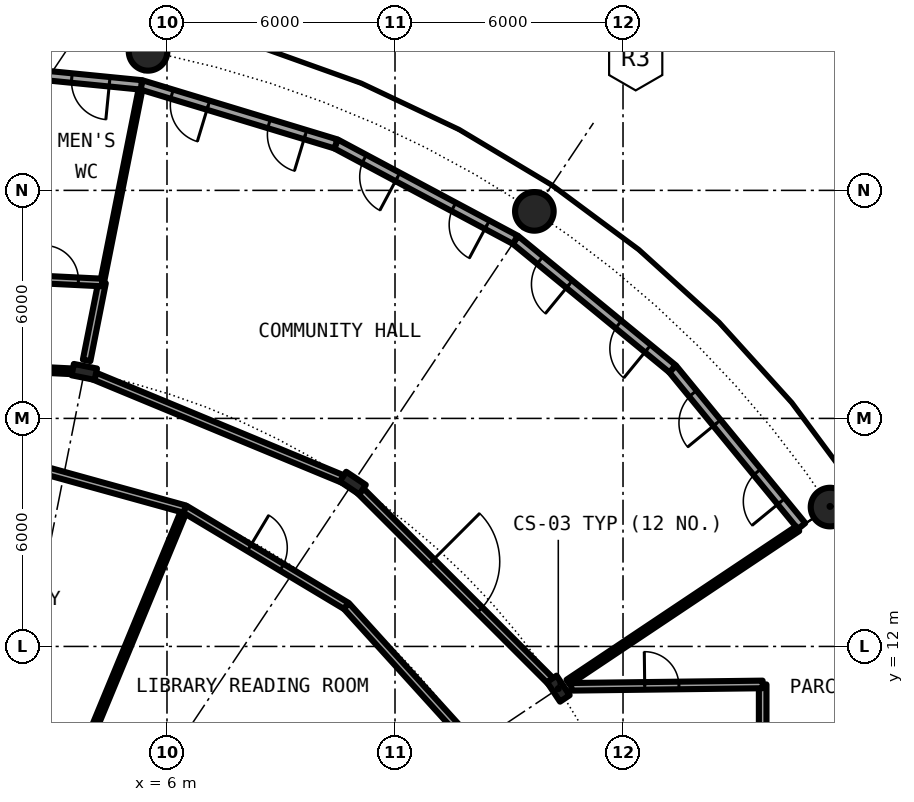
"""IFC4 building model, lengths in metres.
Left out: names, types, materials, properties, quantities, classifications, styles, units other than length and angle.
Written with IfcOpenShell. Run it as: python <this file> out.ifc"""

import sys

from ifc_helpers import new_model, si_unit, direction, frame, frame_2d, origin, origin_2d, place, context, subcontext, project, spatial, rectangle, hollow_circle, i_section, extrude, element, fill, save


model = new_model("IFC4")
c1 = context("Model", 3, precision=1e-05, world=origin(), true_north=direction((0.0, 1.0)))
c2 = subcontext(c1, "Body", "Model", "MODEL_VIEW")
j1 = project(units=[si_unit("LENGTHUNIT", "METRE"), si_unit("PLANEANGLEUNIT", "RADIAN")], contexts=[c1])
p1 = place(None, origin())
s1 = spatial("IfcSite", under=j1, at=p1, CompositionType="ELEMENT")
p2 = place(p1, origin())
s2 = spatial("IfcBuilding", under=s1, at=p2, CompositionType="ELEMENT")
p3 = place(p2, frame((0.0, 0.0, 53.3)))
s3 = spatial("IfcBuildingStorey", under=s2, at=p3, CompositionType="ELEMENT", Elevation=53.3)
for number, where, z_axis, x_axis in (
    (1, (23.448, 15.667, 0.0), (0.0, 0.0, 1.0), (1.0, 0.0, 0.0)),
    (2, (15.667, 23.448, 0.0), (0.0, 0.0, 1.0), (1.0, 0.0, 0.0)),
    (3, (5.501, 27.658, 0.0), (0.0, 0.0, 1.0), (1.0, 0.0, 0.0)),
):
    element("IfcColumn", number, at=place(p3, frame(where, z_axis=z_axis, x_axis=x_axis)), inside=s3, PredefinedType="COLUMN", context=c2, shape_type="SweptSolid", body=[
        extrude(hollow_circle(Radius=0.508, WallThickness=0.05, at=origin_2d()), origin(), (0.0, 0.0, 1.0), 4.2),
    ])
for number, where, z_axis, x_axis in (
    (4, (16.297, 10.889, 0.0), (0.0, 0.0, 1.0), (0.831, 0.556, 0.0)),
    (5, (10.889, 16.297, 0.0), (0.0, 0.0, 1.0), (0.556, 0.831, 0.0)),
    (6, (3.824, 19.223, 0.0), (0.0, 0.0, 1.0), (0.195, 0.981, 0.0)),
):
    element("IfcColumn", number, at=place(p3, frame(where, z_axis=z_axis, x_axis=x_axis)), inside=s3, PredefinedType="COLUMN", context=c2, shape_type="SweptSolid", body=[
        extrude(i_section(OverallWidth=0.305, OverallDepth=0.62, WebThickness=0.021, FlangeThickness=0.04, FilletRadius=0.027, at=origin_2d()), origin(), (0.0, 0.0, 1.0), 4.2),
    ])
p4 = place(p3, frame((22.699, 15.167, 0.0), z_axis=(0.0, 0.0, 1.0), x_axis=(-0.634382322723, 0.773019449054, 0.0)))
e7 = element("IfcWall", 7, at=p4, inside=s3, PredefinedType="SOLIDWALL", context=c2, shape_type="SweptSolid", body=[
    extrude(rectangle(XDim=5.352, YDim=0.25, at=frame_2d((2.676, 0.0))), origin(), (0.0, 0.0, 1.0), 3.8),
])
p5 = place(p4, frame((0.841, 0.0, 0.0)))
e8 = element("IfcOpeningElement", 8, at=p5, cuts=e7, PredefinedType="OPENING", context=c2, shape_type="SweptSolid", body=[
    extrude(rectangle(XDim=1.0, YDim=2.2, at=frame_2d((0.5, 1.1))), frame((0.0, 0.135, 0.0), z_axis=(0.0, -1.0, 0.0), x_axis=(1.0, 0.0, 0.0)), (0.0, 0.0, 1.0), 0.27),
])
p6 = place(p4, frame((3.51, 0.0, 0.0)))
e9 = element("IfcOpeningElement", 9, at=p6, cuts=e7, PredefinedType="OPENING", context=c2, shape_type="SweptSolid", body=[
    extrude(rectangle(XDim=1.0, YDim=2.2, at=frame_2d((0.5, 1.1))), frame((0.0, 0.135, 0.0), z_axis=(0.0, -1.0, 0.0), x_axis=(1.0, 0.0, 0.0)), (0.0, 0.0, 1.0), 0.27),
])
p7 = place(p3, frame((19.304, 19.304, 0.0), z_axis=(0.0, 0.0, 1.0), x_axis=(-0.773019449054, 0.634382322723, 0.0)))
e10 = element("IfcWall", 10, at=p7, inside=s3, PredefinedType="SOLIDWALL", context=c2, shape_type="SweptSolid", body=[
    extrude(rectangle(XDim=5.352, YDim=0.25, at=frame_2d((2.676, 0.0))), origin(), (0.0, 0.0, 1.0), 3.8),
])
p8 = place(p7, frame((0.841, 0.0, 0.0)))
e11 = element("IfcOpeningElement", 11, at=p8, cuts=e10, PredefinedType="OPENING", context=c2, shape_type="SweptSolid", body=[
    extrude(rectangle(XDim=1.0, YDim=2.2, at=frame_2d((0.5, 1.1))), frame((0.0, 0.135, 0.0), z_axis=(0.0, -1.0, 0.0), x_axis=(1.0, 0.0, 0.0)), (0.0, 0.0, 1.0), 0.27),
])
p9 = place(p7, frame((3.51, 0.0, 0.0)))
e12 = element("IfcOpeningElement", 12, at=p9, cuts=e10, PredefinedType="OPENING", context=c2, shape_type="SweptSolid", body=[
    extrude(rectangle(XDim=1.0, YDim=2.2, at=frame_2d((0.5, 1.1))), frame((0.0, 0.135, 0.0), z_axis=(0.0, -1.0, 0.0), x_axis=(1.0, 0.0, 0.0)), (0.0, 0.0, 1.0), 0.27),
])
p10 = place(p3, frame((15.167, 22.699, 0.0), z_axis=(0.0, 0.0, 1.0), x_axis=(-0.881915646801, 0.471407246368, 0.0)))
e13 = element("IfcWall", 13, at=p10, inside=s3, PredefinedType="SOLIDWALL", context=c2, shape_type="SweptSolid", body=[
    extrude(rectangle(XDim=5.352, YDim=0.25, at=frame_2d((2.676, 0.0))), origin(), (0.0, 0.0, 1.0), 3.8),
])
p11 = place(p10, frame((0.841, 0.0, 0.0)))
e14 = element("IfcOpeningElement", 14, at=p11, cuts=e13, PredefinedType="OPENING", context=c2, shape_type="SweptSolid", body=[
    extrude(rectangle(XDim=1.0, YDim=2.2, at=frame_2d((0.5, 1.1))), frame((0.0, 0.135, 0.0), z_axis=(0.0, -1.0, 0.0), x_axis=(1.0, 0.0, 0.0)), (0.0, 0.0, 1.0), 0.27),
])
p12 = place(p10, frame((3.51, 0.0, 0.0)))
e15 = element("IfcOpeningElement", 15, at=p12, cuts=e13, PredefinedType="OPENING", context=c2, shape_type="SweptSolid", body=[
    extrude(rectangle(XDim=1.0, YDim=2.2, at=frame_2d((0.5, 1.1))), frame((0.0, 0.135, 0.0), z_axis=(0.0, -1.0, 0.0), x_axis=(1.0, 0.0, 0.0)), (0.0, 0.0, 1.0), 0.27),
])
p13 = place(p3, frame((10.447, 25.222, 0.0), z_axis=(0.0, 0.0, 1.0), x_axis=(-0.956965678721, 0.290201119486, 0.0)))
e16 = element("IfcWall", 16, at=p13, inside=s3, PredefinedType="SOLIDWALL", context=c2, shape_type="SweptSolid", body=[
    extrude(rectangle(XDim=5.351, YDim=0.25, at=frame_2d((2.676, 0.0))), origin(), (0.0, 0.0, 1.0), 3.8),
])
p14 = place(p13, frame((0.841, 0.0, 0.0)))
e17 = element("IfcOpeningElement", 17, at=p14, cuts=e16, PredefinedType="OPENING", context=c2, shape_type="SweptSolid", body=[
    extrude(rectangle(XDim=1.0, YDim=2.2, at=frame_2d((0.5, 1.1))), frame((0.0, 0.135, 0.0), z_axis=(0.0, -1.0, 0.0), x_axis=(1.0, 0.0, 0.0)), (0.0, 0.0, 1.0), 0.27),
])
p15 = place(p13, frame((3.51, 0.0, 0.0)))
e18 = element("IfcOpeningElement", 18, at=p15, cuts=e16, PredefinedType="OPENING", context=c2, shape_type="SweptSolid", body=[
    extrude(rectangle(XDim=1.0, YDim=2.2, at=frame_2d((0.5, 1.1))), frame((0.0, 0.135, 0.0), z_axis=(0.0, -1.0, 0.0), x_axis=(1.0, 0.0, 0.0)), (0.0, 0.0, 1.0), 0.27),
])
p16 = place(p3, frame((5.326, 26.775, 0.0), z_axis=(0.0, 0.0, 1.0), x_axis=(-0.995173996315, 0.098126026407, 0.0)))
e19 = element("IfcWall", 19, at=p16, inside=s3, PredefinedType="SOLIDWALL", context=c2, shape_type="SweptSolid", body=[
    extrude(rectangle(XDim=5.352, YDim=0.25, at=frame_2d((2.676, 0.0))), origin(), (0.0, 0.0, 1.0), 3.8),
])
p17 = place(p16, frame((0.841, 0.0, 0.0)))
e20 = element("IfcOpeningElement", 20, at=p17, cuts=e19, PredefinedType="OPENING", context=c2, shape_type="SweptSolid", body=[
    extrude(rectangle(XDim=1.0, YDim=2.2, at=frame_2d((0.5, 1.1))), frame((0.0, 0.135, 0.0), z_axis=(0.0, -1.0, 0.0), x_axis=(1.0, 0.0, 0.0)), (0.0, 0.0, 1.0), 0.27),
])
p18 = place(p16, frame((3.51, 0.0, 0.0)))
e21 = element("IfcOpeningElement", 21, at=p18, cuts=e19, PredefinedType="OPENING", context=c2, shape_type="SweptSolid", body=[
    extrude(rectangle(XDim=1.0, YDim=2.2, at=frame_2d((0.5, 1.1))), frame((0.0, 0.135, 0.0), z_axis=(0.0, -1.0, 0.0), x_axis=(1.0, 0.0, 0.0)), (0.0, 0.0, 1.0), 0.27),
])
p19 = place(p3, frame((21.675, 9.4, 0.0), z_axis=(0.0, 0.0, 1.0), x_axis=(0.0, 1.0, 0.0)))
e22 = element("IfcWall", 22, at=p19, inside=s3, PredefinedType="PARTITIONING", context=c2, shape_type="SweptSolid", body=[
    extrude(rectangle(XDim=1.6, YDim=0.2, at=frame_2d((0.8, 0.0))), origin(), (0.0, 0.0, 1.0), 3.8),
])
p20 = place(p3, frame((2.954, 7.132, 0.0), z_axis=(0.0, 0.0, 1.0), x_axis=(0.382646942224, 0.923894646378, 0.0)))
e23 = element("IfcWall", 23, at=p20, inside=s3, PredefinedType="PARTITIONING", context=c2, shape_type="SweptSolid", body=[
    extrude(rectangle(XDim=9.181, YDim=0.15, at=frame_2d((4.59, 0.0))), origin(), (0.0, 0.0, 1.0), 3.8),
])
p21 = place(p3, frame((3.885, 19.527, 0.0), z_axis=(0.0, 0.0, 1.0), x_axis=(0.194745508922, 0.980853804986, 0.0)))
e24 = element("IfcWall", 24, at=p21, inside=s3, PredefinedType="PARTITIONING", context=c2, shape_type="SweptSolid", body=[
    extrude(rectangle(XDim=2.09, YDim=0.2, at=frame_2d((1.045, 0.0))), origin(), (0.0, 0.0, 1.0), 3.8),
])
p22 = place(p3, frame((4.292, 21.577, 0.0), z_axis=(0.0, 0.0, 1.0), x_axis=(0.19514541008, 0.980774321098, 0.0)))
e25 = element("IfcWall", 25, at=p22, inside=s3, PredefinedType="PARTITIONING", context=c2, shape_type="SweptSolid", body=[
    extrude(rectangle(XDim=5.176, YDim=0.1, at=frame_2d((2.588, 0.0))), origin(), (0.0, 0.0, 1.0), 3.8),
])
p23 = place(p3, frame((16.555, 11.061, 0.0), z_axis=(0.0, 0.0, 1.0), x_axis=(0.831403467378, 0.55566921314, 0.0)))
e26 = element("IfcWall", 26, at=p23, inside=s3, PredefinedType="PARTITIONING", context=c2, shape_type="SweptSolid", body=[
    extrude(rectangle(XDim=7.265, YDim=0.15, at=frame_2d((3.632, 0.0))), origin(), (0.0, 0.0, 1.0), 3.8),
])
p24 = place(p3, frame((16.637, 10.938, 0.0), z_axis=(0.0, 0.0, 1.0), x_axis=(0.99992425795, 0.012307654658, 0.0)))
e27 = element("IfcWall", 27, at=p24, inside=s3, PredefinedType="PARTITIONING", context=c2, shape_type="SweptSolid", body=[
    extrude(rectangle(XDim=5.039, YDim=0.2, at=frame_2d((2.519, 0.0))), origin(), (0.0, 0.0, 1.0), 3.8),
])
p25 = place(p24, frame((1.934, 0.0, 0.0)))
e28 = element("IfcOpeningElement", 28, at=p25, cuts=e27, PredefinedType="OPENING", context=c2, shape_type="SweptSolid", body=[
    extrude(rectangle(XDim=0.9, YDim=2.3, at=frame_2d((0.45, 1.15))), frame((0.0, 0.11, 0.0), z_axis=(0.0, -1.0, 0.0), x_axis=(1.0, 0.0, 0.0)), (0.0, 0.0, 1.0), 0.22),
])
p26 = place(p3, frame((6.467, 15.614, 0.0), z_axis=(0.0, 0.0, 1.0), x_axis=(0.857696997328, -0.514155483074, 0.0)))
e29 = element("IfcWall", 29, at=p26, inside=s3, PredefinedType="PARTITIONING", context=c2, shape_type="SweptSolid", body=[
    extrude(rectangle(XDim=4.96, YDim=0.2, at=frame_2d((2.48, 0.0))), origin(), (0.0, 0.0, 1.0), 3.8),
])
p27 = place(p26, frame((1.98, 0.0, 0.0)))
e30 = element("IfcOpeningElement", 30, at=p27, cuts=e29, PredefinedType="OPENING", context=c2, shape_type="SweptSolid", body=[
    extrude(rectangle(XDim=1.0, YDim=2.3, at=frame_2d((0.5, 1.15))), frame((0.0, 0.11, 0.0), z_axis=(0.0, -1.0, 0.0), x_axis=(1.0, 0.0, 0.0)), (0.0, 0.0, 1.0), 0.22),
])
p28 = place(p3, frame((10.721, 13.064, 0.0), z_axis=(0.0, 0.0, 1.0), x_axis=(0.671573636767, -0.740937818173, 0.0)))
e31 = element("IfcWall", 31, at=p28, inside=s3, PredefinedType="PARTITIONING", context=c2, shape_type="SweptSolid", body=[
    extrude(rectangle(XDim=4.945, YDim=0.2, at=frame_2d((2.473, 0.0))), origin(), (0.0, 0.0, 1.0), 3.8),
])
p29 = place(p3, frame((2.48, 16.717, 0.0), z_axis=(0.0, 0.0, 1.0), x_axis=(0.96379724587, -0.266636210694, 0.0)))
e32 = element("IfcWall", 32, at=p29, inside=s3, PredefinedType="PARTITIONING", context=c2, shape_type="SweptSolid", body=[
    extrude(rectangle(XDim=4.137, YDim=0.2, at=frame_2d((2.068, 0.0))), origin(), (0.0, 0.0, 1.0), 3.8),
])
p30 = place(p3, frame((3.967, 19.164, 0.0), z_axis=(0.0, 0.0, 1.0), x_axis=(0.923873274019, -0.382698541353, 0.0)))
e33 = element("IfcWall", 33, at=p30, inside=s3, PredefinedType="PARTITIONING", context=c2, shape_type="SweptSolid", body=[
    extrude(rectangle(XDim=7.338, YDim=0.2, at=frame_2d((3.669, 0.0))), origin(), (0.0, 0.0, 1.0), 3.48),
])
p31 = place(p3, frame((10.999, 16.187, 0.0), z_axis=(0.0, 0.0, 1.0), x_axis=(0.707106781187, -0.707106781187, 0.0)))
e34 = element("IfcWall", 34, at=p31, inside=s3, PredefinedType="PARTITIONING", context=c2, shape_type="SweptSolid", body=[
    extrude(rectangle(XDim=7.337, YDim=0.2, at=frame_2d((3.668, 0.0))), origin(), (0.0, 0.0, 1.0), 3.48),
])
p32 = place(p31, frame((2.768, 0.0, 0.0)))
e35 = element("IfcOpeningElement", 35, at=p32, cuts=e34, PredefinedType="OPENING", context=c2, shape_type="SweptSolid", body=[
    extrude(rectangle(XDim=1.8, YDim=2.3, at=frame_2d((0.9, 1.15))), frame((0.0, 0.11, 0.0), z_axis=(0.0, -1.0, 0.0), x_axis=(1.0, 0.0, 0.0)), (0.0, 0.0, 1.0), 0.22),
])
p33 = place(p3, frame((-1.921, 19.506, 0.0), z_axis=(0.0, 0.0, 1.0), x_axis=(0.99879118777, -0.049154483346, 0.0)))
e36 = element("IfcWall", 36, at=p33, inside=s3, PredefinedType="PARTITIONING", context=c2, shape_type="SweptSolid", body=[
    extrude(rectangle(XDim=5.598, YDim=0.15, at=frame_2d((2.799, 0.0))), origin(), (0.0, 0.0, 1.0), 3.48),
])
p34 = place(p33, frame((2.376, 0.0, 0.0)))
e37 = element("IfcOpeningElement", 37, at=p34, cuts=e36, PredefinedType="OPENING", context=c2, shape_type="SweptSolid", body=[
    extrude(rectangle(XDim=1.0, YDim=2.3, at=frame_2d((0.5, 1.15))), frame((0.0, 0.085, 0.0), z_axis=(0.0, -1.0, 0.0), x_axis=(1.0, 0.0, 0.0)), (0.0, 0.0, 1.0), 0.17),
])
p35 = place(p3, frame((-2.156, 21.894, 0.0), z_axis=(0.0, 0.0, 1.0), x_axis=(0.998785221138, -0.049275572418, 0.0)))
e38 = element("IfcWall", 38, at=p35, inside=s3, PredefinedType="PARTITIONING", context=c2, shape_type="SweptSolid", body=[
    extrude(rectangle(XDim=6.456, YDim=0.2, at=frame_2d((3.228, 0.0))), origin(), (0.0, 0.0, 1.0), 3.8),
])
p36 = place(p35, frame((4.93, 0.0, 0.0)))
e39 = element("IfcOpeningElement", 39, at=p36, cuts=e38, PredefinedType="OPENING", context=c2, shape_type="SweptSolid", body=[
    extrude(rectangle(XDim=0.9, YDim=2.3, at=frame_2d((0.45, 1.15))), frame((0.0, 0.11, 0.0), z_axis=(0.0, -1.0, 0.0), x_axis=(1.0, 0.0, 0.0)), (0.0, 0.0, 1.0), 0.22),
])
p37 = place(p35, frame((2.788, 0.0, 0.0)))
e40 = element("IfcOpeningElement", 40, at=p37, cuts=e38, PredefinedType="OPENING", context=c2, shape_type="SweptSolid", body=[
    extrude(rectangle(XDim=0.9, YDim=2.3, at=frame_2d((0.45, 1.15))), frame((0.0, 0.11, 0.0), z_axis=(0.0, -1.0, 0.0), x_axis=(1.0, 0.0, 0.0)), (0.0, 0.0, 1.0), 0.22),
])
p38 = place(p35, frame((0.626, 0.0, 0.0)))
e41 = element("IfcOpeningElement", 41, at=p38, cuts=e38, PredefinedType="OPENING", context=c2, shape_type="SweptSolid", body=[
    extrude(rectangle(XDim=0.9, YDim=2.3, at=frame_2d((0.45, 1.15))), frame((0.0, 0.11, 0.0), z_axis=(0.0, -1.0, 0.0), x_axis=(1.0, 0.0, 0.0)), (0.0, 0.0, 1.0), 0.22),
])
p39 = place(p5, origin())
e42 = element("IfcDoor", 42, at=p39, inside=s3, OperationType="SINGLE_SWING_LEFT", PredefinedType="DOOR", context=c2, shape_type="SweptSolid", body=[
    extrude(rectangle(XDim=1.0, YDim=2.2, at=frame_2d((0.5, 1.1))), frame((0.0, 0.025, 0.0), z_axis=(0.0, -1.0, 0.0), x_axis=(1.0, 0.0, 0.0)), (0.0, 0.0, 1.0), 0.05),
])
fill(e8, e42)
p40 = place(p6, origin())
e43 = element("IfcDoor", 43, at=p40, inside=s3, OperationType="SINGLE_SWING_LEFT", PredefinedType="DOOR", context=c2, shape_type="SweptSolid", body=[
    extrude(rectangle(XDim=1.0, YDim=2.2, at=frame_2d((0.5, 1.1))), frame((0.0, 0.025, 0.0), z_axis=(0.0, -1.0, 0.0), x_axis=(1.0, 0.0, 0.0)), (0.0, 0.0, 1.0), 0.05),
])
fill(e9, e43)
p41 = place(p8, origin())
e44 = element("IfcDoor", 44, at=p41, inside=s3, OperationType="SINGLE_SWING_LEFT", PredefinedType="DOOR", context=c2, shape_type="SweptSolid", body=[
    extrude(rectangle(XDim=1.0, YDim=2.2, at=frame_2d((0.5, 1.1))), frame((0.0, 0.025, 0.0), z_axis=(0.0, -1.0, 0.0), x_axis=(1.0, 0.0, 0.0)), (0.0, 0.0, 1.0), 0.05),
])
fill(e11, e44)
p42 = place(p9, origin())
e45 = element("IfcDoor", 45, at=p42, inside=s3, OperationType="SINGLE_SWING_LEFT", PredefinedType="DOOR", context=c2, shape_type="SweptSolid", body=[
    extrude(rectangle(XDim=1.0, YDim=2.2, at=frame_2d((0.5, 1.1))), frame((0.0, 0.025, 0.0), z_axis=(0.0, -1.0, 0.0), x_axis=(1.0, 0.0, 0.0)), (0.0, 0.0, 1.0), 0.05),
])
fill(e12, e45)
p43 = place(p11, origin())
e46 = element("IfcDoor", 46, at=p43, inside=s3, OperationType="SINGLE_SWING_LEFT", PredefinedType="DOOR", context=c2, shape_type="SweptSolid", body=[
    extrude(rectangle(XDim=1.0, YDim=2.2, at=frame_2d((0.5, 1.1))), frame((0.0, 0.025, 0.0), z_axis=(0.0, -1.0, 0.0), x_axis=(1.0, 0.0, 0.0)), (0.0, 0.0, 1.0), 0.05),
])
fill(e14, e46)
p44 = place(p12, origin())
e47 = element("IfcDoor", 47, at=p44, inside=s3, OperationType="SINGLE_SWING_LEFT", PredefinedType="DOOR", context=c2, shape_type="SweptSolid", body=[
    extrude(rectangle(XDim=1.0, YDim=2.2, at=frame_2d((0.5, 1.1))), frame((0.0, 0.025, 0.0), z_axis=(0.0, -1.0, 0.0), x_axis=(1.0, 0.0, 0.0)), (0.0, 0.0, 1.0), 0.05),
])
fill(e15, e47)
p45 = place(p14, origin())
e48 = element("IfcDoor", 48, at=p45, inside=s3, OperationType="SINGLE_SWING_LEFT", PredefinedType="DOOR", context=c2, shape_type="SweptSolid", body=[
    extrude(rectangle(XDim=1.0, YDim=2.2, at=frame_2d((0.5, 1.1))), frame((0.0, 0.025, 0.0), z_axis=(0.0, -1.0, 0.0), x_axis=(1.0, 0.0, 0.0)), (0.0, 0.0, 1.0), 0.05),
])
fill(e17, e48)
p46 = place(p15, origin())
e49 = element("IfcDoor", 49, at=p46, inside=s3, OperationType="SINGLE_SWING_LEFT", PredefinedType="DOOR", context=c2, shape_type="SweptSolid", body=[
    extrude(rectangle(XDim=1.0, YDim=2.2, at=frame_2d((0.5, 1.1))), frame((0.0, 0.025, 0.0), z_axis=(0.0, -1.0, 0.0), x_axis=(1.0, 0.0, 0.0)), (0.0, 0.0, 1.0), 0.05),
])
fill(e18, e49)
p47 = place(p17, origin())
e50 = element("IfcDoor", 50, at=p47, inside=s3, OperationType="SINGLE_SWING_LEFT", PredefinedType="DOOR", context=c2, shape_type="SweptSolid", body=[
    extrude(rectangle(XDim=1.0, YDim=2.2, at=frame_2d((0.5, 1.1))), frame((0.0, 0.025, 0.0), z_axis=(0.0, -1.0, 0.0), x_axis=(1.0, 0.0, 0.0)), (0.0, 0.0, 1.0), 0.05),
])
fill(e20, e50)
p48 = place(p36, origin())
e51 = element("IfcDoor", 51, at=p48, inside=s3, OperationType="SINGLE_SWING_RIGHT", PredefinedType="DOOR", context=c2, shape_type="SweptSolid", body=[
    extrude(rectangle(XDim=0.9, YDim=2.3, at=frame_2d((0.45, 1.15))), frame((0.0, 0.025, 0.0), z_axis=(0.0, -1.0, 0.0), x_axis=(1.0, 0.0, 0.0)), (0.0, 0.0, 1.0), 0.05),
])
fill(e39, e51)
p49 = place(p32, origin())
e52 = element("IfcDoor", 52, at=p49, inside=s3, OperationType="DOUBLE_DOOR_SINGLE_SWING", PredefinedType="DOOR", context=c2, shape_type="SweptSolid", body=[
    extrude(rectangle(XDim=1.8, YDim=2.3, at=frame_2d((0.9, 1.15))), frame((0.0, 0.025, 0.0), z_axis=(0.0, -1.0, 0.0), x_axis=(1.0, 0.0, 0.0)), (0.0, 0.0, 1.0), 0.05),
])
fill(e35, e52)
p50 = place(p27, origin())
e53 = element("IfcDoor", 53, at=p50, inside=s3, OperationType="SINGLE_SWING_LEFT", PredefinedType="DOOR", context=c2, shape_type="SweptSolid", body=[
    extrude(rectangle(XDim=1.0, YDim=2.3, at=frame_2d((0.5, 1.15))), frame((0.0, 0.025, 0.0), z_axis=(0.0, -1.0, 0.0), x_axis=(1.0, 0.0, 0.0)), (0.0, 0.0, 1.0), 0.05),
])
fill(e30, e53)
p51 = place(p25, origin())
e54 = element("IfcDoor", 54, at=p51, inside=s3, OperationType="SINGLE_SWING_LEFT", PredefinedType="DOOR", context=c2, shape_type="SweptSolid", body=[
    extrude(rectangle(XDim=0.9, YDim=2.3, at=frame_2d((0.45, 1.15))), frame((0.0, 0.025, 0.0), z_axis=(0.0, -1.0, 0.0), x_axis=(1.0, 0.0, 0.0)), (0.0, 0.0, 1.0), 0.05),
])
fill(e28, e54)
save(model, sys.argv[1])
